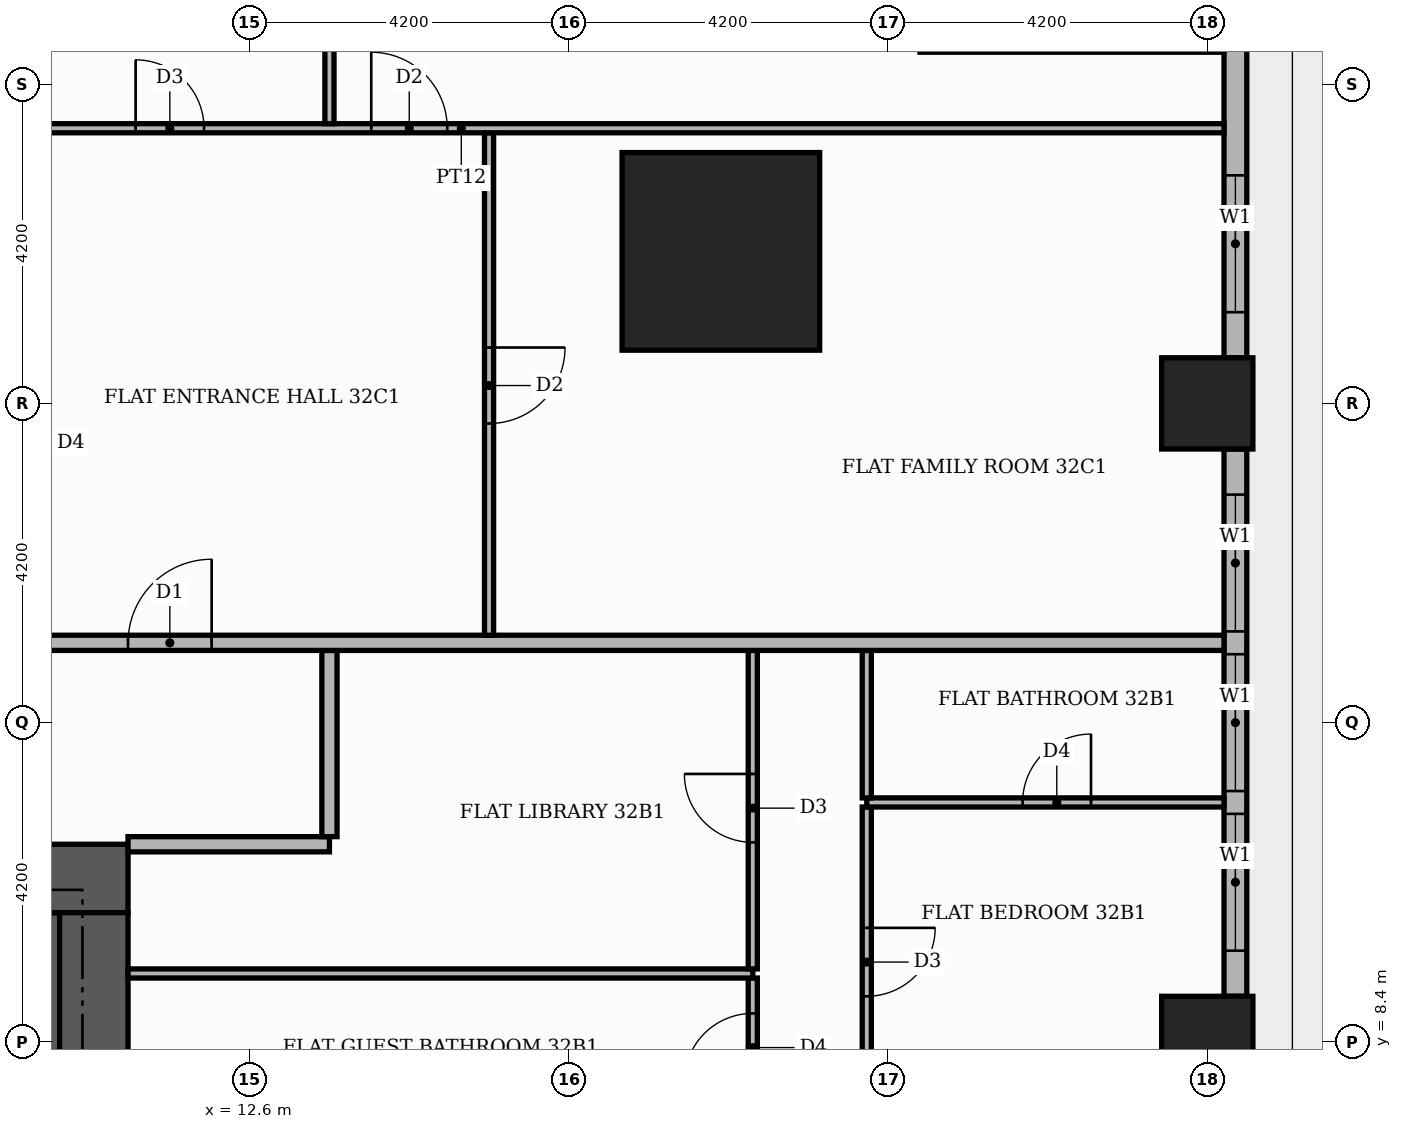
"""IFC4 building model, lengths in metres.
Left out: names, types, materials, properties, quantities, classifications, styles, units other than length and angle.
Written with IfcOpenShell. Run it as: python <this file> out.ifc"""

import sys

from ifc_helpers import new_model, si_unit, direction, frame, frame_2d, origin, origin_2d, place, context, subcontext, project, spatial, rectangle, extrude, element, fill, save


model = new_model("IFC4")
c1 = context("Model", 3, precision=1e-05, world=origin(), true_north=direction((0.0, 1.0)))
c2 = subcontext(c1, "Body", "Model", "MODEL_VIEW")
j1 = project(units=[si_unit("LENGTHUNIT", "METRE"), si_unit("PLANEANGLEUNIT", "RADIAN")], contexts=[c1])
p1 = place(None, origin())
s1 = spatial("IfcSite", under=j1, at=p1, CompositionType="ELEMENT")
p2 = place(p1, origin())
s2 = spatial("IfcBuilding", under=s1, at=p2, CompositionType="ELEMENT")
p3 = place(p2, frame((0.0, 0.0, 137.7)))
s3 = spatial("IfcBuildingStorey", under=s2, at=p3, CompositionType="ELEMENT", Elevation=137.7)
p4 = place(p3, frame((5.5, 9.15, 0.0), z_axis=(0.0, 0.0, 1.0), x_axis=(1.0, 0.0, 0.0)))
e1 = element("IfcWall", 1, at=p4, inside=s3, PredefinedType="SHEAR", context=c2, shape_type="SweptSolid", body=[
    extrude(rectangle(XDim=4.6, YDim=1.9, at=frame_2d((2.3, 0.0))), origin(), (0.0, 0.0, 1.0), 3.48),
])
p5 = place(p3, frame((-11.0, 10.55, 0.0), z_axis=(0.0, 0.0, 1.0), x_axis=(1.0, 0.0, 0.0)))
e2 = element("IfcWall", 2, at=p5, inside=s3, PredefinedType="SHEAR", context=c2, shape_type="SweptSolid", body=[
    extrude(rectangle(XDim=22.0, YDim=0.9, at=frame_2d((11.0, 0.0))), origin(), (0.0, 0.0, 1.0), 3.48),
])
p6 = place(p5, frame((13.3, 0.0, 0.0)))
e3 = element("IfcOpeningElement", 3, at=p6, cuts=e2, PredefinedType="OPENING", context=c2, shape_type="SweptSolid", body=[
    extrude(rectangle(XDim=1.8, YDim=2.2, at=frame_2d((0.9, 1.1))), frame((0.0, 0.46, 0.0), z_axis=(0.0, -1.0, 0.0), x_axis=(1.0, 0.0, 0.0)), (0.0, 0.0, 1.0), 0.92),
])
p7 = place(p3, frame((10.55, -10.1, 0.0), z_axis=(0.0, 0.0, 1.0), x_axis=(0.0, 1.0, 0.0)))
e4 = element("IfcWall", 4, at=p7, inside=s3, PredefinedType="SHEAR", context=c2, shape_type="SweptSolid", body=[
    extrude(rectangle(XDim=20.2, YDim=0.9, at=frame_2d((10.1, 0.0))), origin(), (0.0, 0.0, 1.0), 3.48),
])
p8 = place(p3, frame((18.8, 18.8, 0.0), z_axis=(0.0, 0.0, 1.0), x_axis=(1.0, 0.0, 0.0)))
e5 = element("IfcColumn", 5, at=p8, inside=s3, PredefinedType="COLUMN", context=c2, shape_type="SweptSolid", body=[
    extrude(rectangle(XDim=2.6, YDim=2.6, at=origin_2d()), origin(), (0.0, 0.0, 1.0), 3.9),
])
for number, where, z_axis, x_axis in (
    (6, (25.2, 8.4, 0.0), (0.0, 0.0, 1.0), (1.0, 0.0, 0.0)),
    (7, (25.2, 16.8, 0.0), (0.0, 0.0, 1.0), (1.0, 0.0, 0.0)),
):
    element("IfcColumn", number, at=place(p3, frame(where, z_axis=z_axis, x_axis=x_axis)), inside=s3, PredefinedType="COLUMN", context=c2, shape_type="SweptSolid", body=[
        extrude(rectangle(XDim=1.2, YDim=1.2, at=origin_2d()), origin(), (0.0, 0.0, 1.0), 3.9),
    ])
p9 = place(p3, frame((25.57, 9.0, 0.0), z_axis=(0.0, 0.0, 1.0), x_axis=(0.0, 1.0, 0.0)))
e8 = element("IfcWall", 8, at=p9, inside=s3, PredefinedType="STANDARD", context=c2, shape_type="SweptSolid", body=[
    extrude(rectangle(XDim=7.2, YDim=0.3, at=frame_2d((3.6, 0.0))), origin(), (0.0, 0.0, 1.0), 3.48),
])
p10 = place(p9, frame((0.6, 0.0, 0.9)))
e9 = element("IfcOpeningElement", 9, at=p10, cuts=e8, PredefinedType="OPENING", context=c2, shape_type="SweptSolid", body=[
    extrude(rectangle(XDim=1.8, YDim=2.1, at=frame_2d((0.9, 1.05))), frame((0.0, 0.16, 0.0), z_axis=(0.0, -1.0, 0.0), x_axis=(1.0, 0.0, 0.0)), (0.0, 0.0, 1.0), 0.32),
])
p11 = place(p9, frame((2.7, 0.0, 0.9)))
e10 = element("IfcOpeningElement", 10, at=p11, cuts=e8, PredefinedType="OPENING", context=c2, shape_type="SweptSolid", body=[
    extrude(rectangle(XDim=1.8, YDim=2.1, at=frame_2d((0.9, 1.05))), frame((0.0, 0.16, 0.0), z_axis=(0.0, -1.0, 0.0), x_axis=(1.0, 0.0, 0.0)), (0.0, 0.0, 1.0), 0.32),
])
p12 = place(p9, frame((4.8, 0.0, 0.9)))
e11 = element("IfcOpeningElement", 11, at=p12, cuts=e8, PredefinedType="OPENING", context=c2, shape_type="SweptSolid", body=[
    extrude(rectangle(XDim=1.8, YDim=2.1, at=frame_2d((0.9, 1.05))), frame((0.0, 0.16, 0.0), z_axis=(0.0, -1.0, 0.0), x_axis=(1.0, 0.0, 0.0)), (0.0, 0.0, 1.0), 0.32),
])
p13 = place(p3, frame((25.57, 17.4, 0.0), z_axis=(0.0, 0.0, 1.0), x_axis=(0.0, 1.0, 0.0)))
e12 = element("IfcWall", 12, at=p13, inside=s3, PredefinedType="STANDARD", context=c2, shape_type="SweptSolid", body=[
    extrude(rectangle(XDim=4.32, YDim=0.3, at=frame_2d((2.16, 0.0))), origin(), (0.0, 0.0, 1.0), 3.48),
])
p14 = place(p13, frame((0.6, 0.0, 0.9)))
e13 = element("IfcOpeningElement", 13, at=p14, cuts=e12, PredefinedType="OPENING", context=c2, shape_type="SweptSolid", body=[
    extrude(rectangle(XDim=1.8, YDim=2.1, at=frame_2d((0.9, 1.05))), frame((0.0, 0.16, 0.0), z_axis=(0.0, -1.0, 0.0), x_axis=(1.0, 0.0, 0.0)), (0.0, 0.0, 1.0), 0.32),
])
p15 = place(p3, frame((19.22, 7.41, 0.0), z_axis=(0.0, 0.0, 1.0), x_axis=(0.0, 1.0, 0.0)))
e14 = element("IfcWall", 14, at=p15, inside=s3, PredefinedType="PARTITIONING", context=c2, shape_type="SweptSolid", body=[
    extrude(rectangle(XDim=1.83, YDim=0.12, at=frame_2d((0.915, 0.0))), origin(), (0.0, 0.0, 1.0), 3.48),
])
p16 = place(p15, frame((0.465, 0.0, 0.0)))
e15 = element("IfcOpeningElement", 15, at=p16, cuts=e14, PredefinedType="OPENING", context=c2, shape_type="SweptSolid", body=[
    extrude(rectangle(XDim=0.9, YDim=2.1, at=frame_2d((0.45, 1.05))), frame((0.0, 0.07, 0.0), z_axis=(0.0, -1.0, 0.0), x_axis=(1.0, 0.0, 0.0)), (0.0, 0.0, 1.0), 0.14),
])
p17 = place(p3, frame((20.72, 7.41, 0.0), z_axis=(0.0, 0.0, 1.0), x_axis=(0.0, 1.0, 0.0)))
e16 = element("IfcWall", 16, at=p17, inside=s3, PredefinedType="PARTITIONING", context=c2, shape_type="SweptSolid", body=[
    extrude(rectangle(XDim=4.08, YDim=0.12, at=frame_2d((2.04, 0.0))), origin(), (0.0, 0.0, 1.0), 3.48),
])
p18 = place(p17, frame((1.59, 0.0, 0.0)))
e17 = element("IfcOpeningElement", 17, at=p18, cuts=e16, PredefinedType="OPENING", context=c2, shape_type="SweptSolid", body=[
    extrude(rectangle(XDim=0.9, YDim=2.1, at=frame_2d((0.45, 1.05))), frame((0.0, 0.07, 0.0), z_axis=(0.0, -1.0, 0.0), x_axis=(1.0, 0.0, 0.0)), (0.0, 0.0, 1.0), 0.14),
])
p19 = place(p3, frame((11.0, 9.3, 0.0), z_axis=(0.0, 0.0, 1.0), x_axis=(1.0, 0.0, 0.0)))
e18 = element("IfcWall", 18, at=p19, inside=s3, PredefinedType="PARTITIONING", context=c2, shape_type="SweptSolid", body=[
    extrude(rectangle(XDim=8.22, YDim=0.12, at=frame_2d((4.11, 0.0))), origin(), (0.0, 0.0, 1.0), 3.48),
])
p20 = place(p3, frame((19.22, 9.36, 0.0), z_axis=(0.0, 0.0, 1.0), x_axis=(0.0, 1.0, 0.0)))
e19 = element("IfcWall", 19, at=p20, inside=s3, PredefinedType="PARTITIONING", context=c2, shape_type="SweptSolid", body=[
    extrude(rectangle(XDim=4.19, YDim=0.12, at=frame_2d((2.095, 0.0))), origin(), (0.0, 0.0, 1.0), 3.48),
])
p21 = place(p20, frame((1.665, 0.0, 0.0)))
e20 = element("IfcOpeningElement", 20, at=p21, cuts=e19, PredefinedType="OPENING", context=c2, shape_type="SweptSolid", body=[
    extrude(rectangle(XDim=0.9, YDim=2.1, at=frame_2d((0.45, 1.05))), frame((0.0, 0.07, 0.0), z_axis=(0.0, -1.0, 0.0), x_axis=(1.0, 0.0, 0.0)), (0.0, 0.0, 1.0), 0.14),
])
p22 = place(p3, frame((11.0, 11.0, 0.0), z_axis=(0.0, 0.0, 1.0), x_axis=(1.0, 0.0, 0.0)))
e21 = element("IfcWall", 21, at=p22, inside=s3, PredefinedType="PARTITIONING", context=c2, shape_type="SweptSolid", body=[
    extrude(rectangle(XDim=2.65, YDim=0.2, at=frame_2d((1.325, 0.0))), origin(), (0.0, 0.0, 1.0), 3.48),
])
p23 = place(p3, frame((13.65, 11.1, 0.0), z_axis=(0.0, 0.0, 1.0), x_axis=(0.0, 1.0, 0.0)))
e22 = element("IfcWall", 22, at=p23, inside=s3, PredefinedType="PARTITIONING", context=c2, shape_type="SweptSolid", body=[
    extrude(rectangle(XDim=2.45, YDim=0.2, at=frame_2d((1.225, 0.0))), origin(), (0.0, 0.0, 1.0), 3.48),
])
p24 = place(p3, frame((20.72, 11.55, 0.0), z_axis=(0.0, 0.0, 1.0), x_axis=(1.0, 0.0, 0.0)))
e23 = element("IfcWall", 23, at=p24, inside=s3, PredefinedType="PARTITIONING", context=c2, shape_type="SweptSolid", body=[
    extrude(rectangle(XDim=4.7, YDim=0.12, at=frame_2d((2.35, 0.0))), origin(), (0.0, 0.0, 1.0), 3.48),
])
p25 = place(p24, frame((2.05, 0.0, 0.0)))
e24 = element("IfcOpeningElement", 24, at=p25, cuts=e23, PredefinedType="OPENING", context=c2, shape_type="SweptSolid", body=[
    extrude(rectangle(XDim=0.9, YDim=2.1, at=frame_2d((0.45, 1.05))), frame((0.0, 0.07, 0.0), z_axis=(0.0, -1.0, 0.0), x_axis=(1.0, 0.0, 0.0)), (0.0, 0.0, 1.0), 0.14),
])
p26 = place(p3, frame((20.72, 11.61, 0.0), z_axis=(0.0, 0.0, 1.0), x_axis=(0.0, 1.0, 0.0)))
e25 = element("IfcWall", 25, at=p26, inside=s3, PredefinedType="PARTITIONING", context=c2, shape_type="SweptSolid", body=[
    extrude(rectangle(XDim=1.94, YDim=0.12, at=frame_2d((0.97, 0.0))), origin(), (0.0, 0.0, 1.0), 3.48),
])
p27 = place(p3, frame((-13.65, 13.65, 0.0), z_axis=(0.0, 0.0, 1.0), x_axis=(1.0, 0.0, 0.0)))
e26 = element("IfcWall", 26, at=p27, inside=s3, PredefinedType="PARTITIONING", context=c2, shape_type="SweptSolid", body=[
    extrude(rectangle(XDim=39.07, YDim=0.2, at=frame_2d((19.535, 0.0))), origin(), (0.0, 0.0, 1.0), 3.48),
])
p28 = place(p27, frame((24.65, 0.0, 0.0)))
e27 = element("IfcOpeningElement", 27, at=p28, cuts=e26, PredefinedType="OPENING", context=c2, shape_type="SweptSolid", body=[
    extrude(rectangle(XDim=1.1, YDim=2.4, at=frame_2d((0.55, 1.2))), frame((0.0, 0.11, 0.0), z_axis=(0.0, -1.0, 0.0), x_axis=(1.0, 0.0, 0.0)), (0.0, 0.0, 1.0), 0.22),
])
p29 = place(p27, frame((12.05, 0.0, 0.0)))
e28 = element("IfcOpeningElement", 28, at=p29, cuts=e26, PredefinedType="OPENING", context=c2, shape_type="SweptSolid", body=[
    extrude(rectangle(XDim=1.1, YDim=2.4, at=frame_2d((0.55, 1.2))), frame((0.0, 0.11, 0.0), z_axis=(0.0, -1.0, 0.0), x_axis=(1.0, 0.0, 0.0)), (0.0, 0.0, 1.0), 0.22),
])
p30 = place(p3, frame((15.75, 13.75, 0.0), z_axis=(0.0, 0.0, 1.0), x_axis=(0.0, 1.0, 0.0)))
e29 = element("IfcWall", 29, at=p30, inside=s3, PredefinedType="PARTITIONING", context=c2, shape_type="SweptSolid", body=[
    extrude(rectangle(XDim=6.61, YDim=0.12, at=frame_2d((3.305, 0.0))), origin(), (0.0, 0.0, 1.0), 3.48),
])
p31 = place(p30, frame((2.785, 0.0, 0.0)))
e30 = element("IfcOpeningElement", 30, at=p31, cuts=e29, PredefinedType="OPENING", context=c2, shape_type="SweptSolid", body=[
    extrude(rectangle(XDim=1.0, YDim=2.1, at=frame_2d((0.5, 1.05))), frame((0.0, 0.07, 0.0), z_axis=(0.0, -1.0, 0.0), x_axis=(1.0, 0.0, 0.0)), (0.0, 0.0, 1.0), 0.14),
])
p32 = place(p3, frame((5.35, 20.42, 0.0), z_axis=(0.0, 0.0, 1.0), x_axis=(1.0, 0.0, 0.0)))
e31 = element("IfcWall", 31, at=p32, inside=s3, PredefinedType="PARTITIONING", context=c2, shape_type="SweptSolid", body=[
    extrude(rectangle(XDim=20.07, YDim=0.12, at=frame_2d((10.035, 0.0))), origin(), (0.0, 0.0, 1.0), 3.48),
])
p33 = place(p32, frame((8.85, 0.0, 0.0)))
e32 = element("IfcOpeningElement", 32, at=p33, cuts=e31, PredefinedType="OPENING", context=c2, shape_type="SweptSolid", body=[
    extrude(rectangle(XDim=1.0, YDim=2.1, at=frame_2d((0.5, 1.05))), frame((0.0, 0.07, 0.0), z_axis=(0.0, -1.0, 0.0), x_axis=(1.0, 0.0, 0.0)), (0.0, 0.0, 1.0), 0.14),
])
p34 = place(p32, frame((5.75, 0.0, 0.0)))
e33 = element("IfcOpeningElement", 33, at=p34, cuts=e31, PredefinedType="OPENING", context=c2, shape_type="SweptSolid", body=[
    extrude(rectangle(XDim=0.9, YDim=2.1, at=frame_2d((0.45, 1.05))), frame((0.0, 0.07, 0.0), z_axis=(0.0, -1.0, 0.0), x_axis=(1.0, 0.0, 0.0)), (0.0, 0.0, 1.0), 0.14),
])
p35 = place(p3, frame((13.65, 20.48, 0.0), z_axis=(0.0, 0.0, 1.0), x_axis=(0.0, 1.0, 0.0)))
e34 = element("IfcWall", 34, at=p35, inside=s3, PredefinedType="PARTITIONING", context=c2, shape_type="SweptSolid", body=[
    extrude(rectangle(XDim=4.94, YDim=0.12, at=frame_2d((2.47, 0.0))), origin(), (0.0, 0.0, 1.0), 3.48),
])
p36 = place(p10, origin())
e35 = element("IfcWindow", 35, at=p36, inside=s3, PartitioningType="SINGLE_PANEL", PredefinedType="WINDOW", context=c2, shape_type="SweptSolid", body=[
    extrude(rectangle(XDim=1.8, YDim=2.1, at=frame_2d((0.9, 1.05))), frame((0.0, 0.03, 0.0), z_axis=(0.0, -1.0, 0.0), x_axis=(1.0, 0.0, 0.0)), (0.0, 0.0, 1.0), 0.06),
])
fill(e9, e35)
p37 = place(p11, origin())
e36 = element("IfcWindow", 36, at=p37, inside=s3, PartitioningType="SINGLE_PANEL", PredefinedType="WINDOW", context=c2, shape_type="SweptSolid", body=[
    extrude(rectangle(XDim=1.8, YDim=2.1, at=frame_2d((0.9, 1.05))), frame((0.0, 0.03, 0.0), z_axis=(0.0, -1.0, 0.0), x_axis=(1.0, 0.0, 0.0)), (0.0, 0.0, 1.0), 0.06),
])
fill(e10, e36)
p38 = place(p12, origin())
e37 = element("IfcWindow", 37, at=p38, inside=s3, PartitioningType="SINGLE_PANEL", PredefinedType="WINDOW", context=c2, shape_type="SweptSolid", body=[
    extrude(rectangle(XDim=1.8, YDim=2.1, at=frame_2d((0.9, 1.05))), frame((0.0, 0.03, 0.0), z_axis=(0.0, -1.0, 0.0), x_axis=(1.0, 0.0, 0.0)), (0.0, 0.0, 1.0), 0.06),
])
fill(e11, e37)
p39 = place(p14, origin())
e38 = element("IfcWindow", 38, at=p39, inside=s3, PartitioningType="SINGLE_PANEL", PredefinedType="WINDOW", context=c2, shape_type="SweptSolid", body=[
    extrude(rectangle(XDim=1.8, YDim=2.1, at=frame_2d((0.9, 1.05))), frame((0.0, 0.03, 0.0), z_axis=(0.0, -1.0, 0.0), x_axis=(1.0, 0.0, 0.0)), (0.0, 0.0, 1.0), 0.06),
])
fill(e13, e38)
p40 = place(p16, origin())
e39 = element("IfcDoor", 39, at=p40, inside=s3, OperationType="SINGLE_SWING_LEFT", PredefinedType="DOOR", context=c2, shape_type="SweptSolid", body=[
    extrude(rectangle(XDim=0.9, YDim=2.1, at=frame_2d((0.45, 1.05))), frame((0.0, 0.025, 0.0), z_axis=(0.0, -1.0, 0.0), x_axis=(1.0, 0.0, 0.0)), (0.0, 0.0, 1.0), 0.05),
])
fill(e15, e39)
p41 = place(p21, origin())
e40 = element("IfcDoor", 40, at=p41, inside=s3, OperationType="SINGLE_SWING_RIGHT", PredefinedType="DOOR", context=c2, shape_type="SweptSolid", body=[
    extrude(rectangle(XDim=0.9, YDim=2.1, at=frame_2d((0.45, 1.05))), frame((0.0, 0.025, 0.0), z_axis=(0.0, -1.0, 0.0), x_axis=(1.0, 0.0, 0.0)), (0.0, 0.0, 1.0), 0.05),
])
fill(e20, e40)
p42 = place(p18, frame((0.9, 0.0, 0.0), z_axis=(0.0, 0.0, 1.0), x_axis=(-1.0, 0.0, 0.0)))
e41 = element("IfcDoor", 41, at=p42, inside=s3, OperationType="SINGLE_SWING_RIGHT", PredefinedType="DOOR", context=c2, shape_type="SweptSolid", body=[
    extrude(rectangle(XDim=0.9, YDim=2.1, at=frame_2d((0.45, 1.05))), frame((0.0, 0.025, 0.0), z_axis=(0.0, -1.0, 0.0), x_axis=(1.0, 0.0, 0.0)), (0.0, 0.0, 1.0), 0.05),
])
fill(e17, e41)
p43 = place(p25, origin())
e42 = element("IfcDoor", 42, at=p43, inside=s3, OperationType="SINGLE_SWING_RIGHT", PredefinedType="DOOR", context=c2, shape_type="SweptSolid", body=[
    extrude(rectangle(XDim=0.9, YDim=2.1, at=frame_2d((0.45, 1.05))), frame((0.0, 0.025, 0.0), z_axis=(0.0, -1.0, 0.0), x_axis=(1.0, 0.0, 0.0)), (0.0, 0.0, 1.0), 0.05),
])
fill(e24, e42)
p44 = place(p28, origin())
e43 = element("IfcDoor", 43, at=p44, inside=s3, OperationType="SINGLE_SWING_RIGHT", PredefinedType="DOOR", context=c2, shape_type="SweptSolid", body=[
    extrude(rectangle(XDim=1.1, YDim=2.4, at=frame_2d((0.55, 1.2))), frame((0.0, 0.025, 0.0), z_axis=(0.0, -1.0, 0.0), x_axis=(1.0, 0.0, 0.0)), (0.0, 0.0, 1.0), 0.05),
])
fill(e27, e43)
p45 = place(p31, frame((1.0, 0.0, 0.0), z_axis=(0.0, 0.0, 1.0), x_axis=(-1.0, 0.0, 0.0)))
e44 = element("IfcDoor", 44, at=p45, inside=s3, OperationType="SINGLE_SWING_RIGHT", PredefinedType="DOOR", context=c2, shape_type="SweptSolid", body=[
    extrude(rectangle(XDim=1.0, YDim=2.1, at=frame_2d((0.5, 1.05))), frame((0.0, 0.025, 0.0), z_axis=(0.0, -1.0, 0.0), x_axis=(1.0, 0.0, 0.0)), (0.0, 0.0, 1.0), 0.05),
])
fill(e30, e44)
p46 = place(p33, origin())
e45 = element("IfcDoor", 45, at=p46, inside=s3, OperationType="SINGLE_SWING_LEFT", PredefinedType="DOOR", context=c2, shape_type="SweptSolid", body=[
    extrude(rectangle(XDim=1.0, YDim=2.1, at=frame_2d((0.5, 1.05))), frame((0.0, 0.025, 0.0), z_axis=(0.0, -1.0, 0.0), x_axis=(1.0, 0.0, 0.0)), (0.0, 0.0, 1.0), 0.05),
])
fill(e32, e45)
p47 = place(p34, origin())
e46 = element("IfcDoor", 46, at=p47, inside=s3, OperationType="SINGLE_SWING_LEFT", PredefinedType="DOOR", context=c2, shape_type="SweptSolid", body=[
    extrude(rectangle(XDim=0.9, YDim=2.1, at=frame_2d((0.45, 1.05))), frame((0.0, 0.025, 0.0), z_axis=(0.0, -1.0, 0.0), x_axis=(1.0, 0.0, 0.0)), (0.0, 0.0, 1.0), 0.05),
])
fill(e33, e46)
save(model, sys.argv[1])
